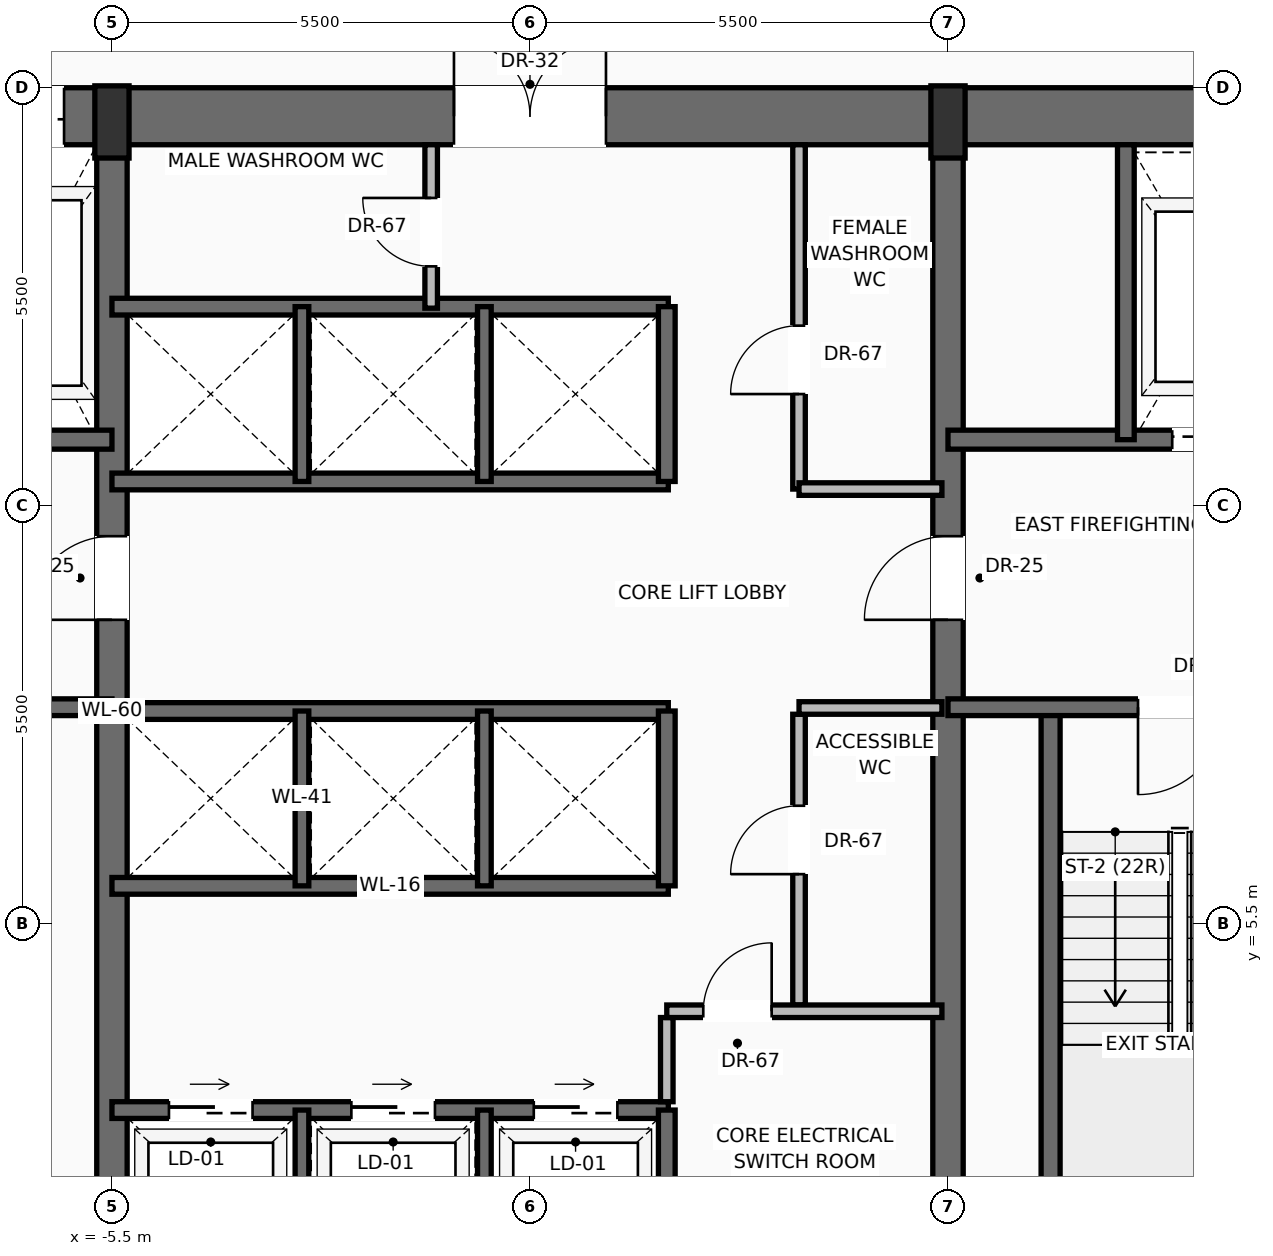
"""IFC4 building model, lengths in metres.
Left out: names, types, materials, properties, quantities, classifications, styles, units other than length and angle.
Written with IfcOpenShell. Run it as: python <this file> out.ifc"""

import sys

from ifc_helpers import new_model, si_unit, direction, frame, frame_2d, origin, origin_2d, place, context, subcontext, project, spatial, rectangle, extrude, source, transform, mapped, element, fill, save


model = new_model("IFC4")
c1 = context("Model", 3, precision=1e-05, world=origin(), true_north=direction((0.0, 1.0)))
c2 = subcontext(c1, "Body", "Model", "MODEL_VIEW")
j1 = project(units=[si_unit("LENGTHUNIT", "METRE"), si_unit("PLANEANGLEUNIT", "RADIAN")], contexts=[c1])
p1 = place(None, origin())
s1 = spatial("IfcSite", under=j1, at=p1, CompositionType="ELEMENT")
p2 = place(p1, origin())
s2 = spatial("IfcBuilding", under=s1, at=p2, CompositionType="ELEMENT")
p3 = place(p2, frame((0.0, 0.0, 109.9)))
s3 = spatial("IfcBuildingStorey", under=s2, at=p3, CompositionType="ELEMENT", Elevation=109.9)
p4 = place(p3, frame((-10.9, 16.125, 0.0), z_axis=(0.0, 0.0, 1.0), x_axis=(1.0, 0.0, 0.0)))
e1 = element("IfcWall", 1, at=p4, inside=s3, PredefinedType="SHEAR", context=c2, shape_type="SweptSolid", body=[
    extrude(rectangle(XDim=21.8, YDim=0.75, at=frame_2d((10.9, 0.0))), origin(), (0.0, 0.0, 1.0), 3.45),
])
p5 = place(p4, frame((3.47, 0.0, 0.0)))
e2 = element("IfcOpeningElement", 2, at=p5, cuts=e1, PredefinedType="OPENING", context=c2, shape_type="SweptSolid", body=[
    extrude(rectangle(XDim=1.3, YDim=2.3, at=frame_2d((0.65, 1.15))), frame((0.0, 0.385, 0.0), z_axis=(0.0, -1.0, 0.0), x_axis=(1.0, 0.0, 0.0)), (0.0, 0.0, 1.0), 0.77),
])
p6 = place(p4, frame((9.9, 0.0, 0.0)))
e3 = element("IfcOpeningElement", 3, at=p6, cuts=e1, PredefinedType="OPENING", context=c2, shape_type="SweptSolid", body=[
    extrude(rectangle(XDim=2.0, YDim=2.4, at=frame_2d((1.0, 1.2))), frame((0.0, 0.385, 0.0), z_axis=(0.0, -1.0, 0.0), x_axis=(1.0, 0.0, 0.0)), (0.0, 0.0, 1.0), 0.77),
])
p7 = place(p3, frame((-5.5, 0.475, 0.0), z_axis=(0.0, 0.0, 1.0), x_axis=(0.0, 1.0, 0.0)))
e4 = element("IfcWall", 4, at=p7, inside=s3, PredefinedType="SHEAR", context=c2, shape_type="SweptSolid", body=[
    extrude(rectangle(XDim=15.65, YDim=0.4, at=frame_2d((7.825, 0.0))), origin(), (0.0, 0.0, 1.0), 3.45),
])
p8 = place(p7, frame((9.025, 0.0, 0.0)))
e5 = element("IfcOpeningElement", 5, at=p8, cuts=e4, PredefinedType="OPENING", context=c2, shape_type="SweptSolid", body=[
    extrude(rectangle(XDim=1.1, YDim=2.2, at=frame_2d((0.55, 1.1))), frame((0.0, 0.21, 0.0), z_axis=(0.0, -1.0, 0.0), x_axis=(1.0, 0.0, 0.0)), (0.0, 0.0, 1.0), 0.42),
])
p9 = place(p3, frame((5.5, 0.475, 0.0), z_axis=(0.0, 0.0, 1.0), x_axis=(0.0, 1.0, 0.0)))
e6 = element("IfcWall", 6, at=p9, inside=s3, PredefinedType="SHEAR", context=c2, shape_type="SweptSolid", body=[
    extrude(rectangle(XDim=15.65, YDim=0.4, at=frame_2d((7.825, 0.0))), origin(), (0.0, 0.0, 1.0), 3.45),
])
p10 = place(p9, frame((9.025, 0.0, 0.0)))
e7 = element("IfcOpeningElement", 7, at=p10, cuts=e6, PredefinedType="OPENING", context=c2, shape_type="SweptSolid", body=[
    extrude(rectangle(XDim=1.1, YDim=2.2, at=frame_2d((0.55, 1.1))), frame((0.0, 0.21, 0.0), z_axis=(0.0, -1.0, 0.0), x_axis=(1.0, 0.0, 0.0)), (0.0, 0.0, 1.0), 0.42),
])
m1 = source(origin(), c2, "Body", "SweptSolid", [
    extrude(rectangle(XDim=0.45, YDim=0.95, at=origin_2d()), origin(), (0.0, 0.0, 1.0), 3.7),
])
for number, where, z_axis, x_axis in (
    (8, (-5.5, 16.05, 0.0), (0.0, 0.0, 1.0), (1.0, 0.0, 0.0)),
    (9, (5.5, 16.05, 0.0), (0.0, 0.0, 1.0), (1.0, 0.0, 0.0)),
):
    element("IfcColumn", number, at=place(p3, frame(where, z_axis=z_axis, x_axis=x_axis)), inside=s3, PredefinedType="PILASTER", context=c2, shape_type="MappedRepresentation", body=[
        mapped(m1, transform((0.0, 0.0, 0.0), scale=1.0)),
    ])
p11 = place(p3, frame((-5.5, 8.35, 0.0), z_axis=(0.0, 0.0, 1.0), x_axis=(-1.0, 0.0, 0.0)))
e10 = element("IfcWall", 10, at=p11, inside=s3, PredefinedType="SOLIDWALL", context=c2, shape_type="SweptSolid", body=[
    extrude(rectangle(XDim=4.65, YDim=0.22, at=frame_2d((2.325, 0.0))), origin(), (0.0, 0.0, 1.0), 3.45),
])
p12 = place(p11, frame((2.5, 0.0, 0.0)))
e11 = element("IfcOpeningElement", 11, at=p12, cuts=e10, PredefinedType="OPENING", context=c2, shape_type="SweptSolid", body=[
    extrude(rectangle(XDim=1.15, YDim=2.2, at=frame_2d((0.575, 1.1))), frame((0.0, 0.12, 0.0), z_axis=(0.0, -1.0, 0.0), x_axis=(1.0, 0.0, 0.0)), (0.0, 0.0, 1.0), 0.24),
])
p13 = place(p3, frame((-5.5, 11.87, 0.0), z_axis=(0.0, 0.0, 1.0), x_axis=(-1.0, 0.0, 0.0)))
e12 = element("IfcWall", 12, at=p13, inside=s3, PredefinedType="SOLIDWALL", context=c2, shape_type="SweptSolid", body=[
    extrude(rectangle(XDim=4.65, YDim=0.25, at=frame_2d((2.325, 0.0))), origin(), (0.0, 0.0, 1.0), 3.45),
])
p14 = place(p13, frame((2.95, 0.0, 0.0)))
e13 = element("IfcOpeningElement", 13, at=p14, cuts=e12, PredefinedType="OPENING", context=c2, shape_type="SweptSolid", body=[
    extrude(rectangle(XDim=1.2, YDim=2.25, at=frame_2d((0.6, 1.125))), frame((0.0, 0.135, 0.0), z_axis=(0.0, -1.0, 0.0), x_axis=(1.0, 0.0, 0.0)), (0.0, 0.0, 1.0), 0.27),
])
p15 = place(p3, frame((6.85, 0.85, 0.0), z_axis=(0.0, 0.0, 1.0), x_axis=(0.0, 1.0, 0.0)))
e14 = element("IfcWall", 14, at=p15, inside=s3, PredefinedType="SOLIDWALL", context=c2, shape_type="SweptSolid", body=[
    extrude(rectangle(XDim=7.5, YDim=0.25, at=frame_2d((3.75, 0.0))), origin(), (0.0, 0.0, 1.0), 3.45),
])
p16 = place(p3, frame((10.15, 8.35, 0.0), z_axis=(0.0, 0.0, 1.0), x_axis=(-1.0, 0.0, 0.0)))
e15 = element("IfcWall", 15, at=p16, inside=s3, PredefinedType="SOLIDWALL", context=c2, shape_type="SweptSolid", body=[
    extrude(rectangle(XDim=4.65, YDim=0.22, at=frame_2d((2.325, 0.0))), origin(), (0.0, 0.0, 1.0), 3.45),
])
p17 = place(p16, frame((1.0, 0.0, 0.0)))
e16 = element("IfcOpeningElement", 16, at=p17, cuts=e15, PredefinedType="OPENING", context=c2, shape_type="SweptSolid", body=[
    extrude(rectangle(XDim=1.15, YDim=2.2, at=frame_2d((0.575, 1.1))), frame((0.0, 0.12, 0.0), z_axis=(0.0, -1.0, 0.0), x_axis=(1.0, 0.0, 0.0)), (0.0, 0.0, 1.0), 0.24),
])
p18 = place(p3, frame((10.15, 11.87, 0.0), z_axis=(0.0, 0.0, 1.0), x_axis=(-1.0, 0.0, 0.0)))
e17 = element("IfcWall", 17, at=p18, inside=s3, PredefinedType="SOLIDWALL", context=c2, shape_type="SweptSolid", body=[
    extrude(rectangle(XDim=4.65, YDim=0.25, at=frame_2d((2.325, 0.0))), origin(), (0.0, 0.0, 1.0), 3.45),
])
p19 = place(p18, frame((0.5, 0.0, 0.0)))
e18 = element("IfcOpeningElement", 18, at=p19, cuts=e17, PredefinedType="OPENING", context=c2, shape_type="SweptSolid", body=[
    extrude(rectangle(XDim=1.2, YDim=2.25, at=frame_2d((0.6, 1.125))), frame((0.0, 0.135, 0.0), z_axis=(0.0, -1.0, 0.0), x_axis=(1.0, 0.0, 0.0)), (0.0, 0.0, 1.0), 0.27),
])
p20 = place(p3, frame((7.84, 11.87, 0.0), z_axis=(0.0, 0.0, 1.0), x_axis=(0.0, 1.0, 0.0)))
e19 = element("IfcWall", 19, at=p20, inside=s3, PredefinedType="SOLIDWALL", context=c2, shape_type="SweptSolid", body=[
    extrude(rectangle(XDim=3.88, YDim=0.22, at=frame_2d((1.94, 0.0))), origin(), (0.0, 0.0, 1.0), 3.45),
])
p21 = place(p3, frame((-5.5, 3.05, 0.0), z_axis=(0.0, 0.0, 1.0), x_axis=(1.0, 0.0, 0.0)))
e20 = element("IfcWall", 20, at=p21, inside=s3, PredefinedType="SOLIDWALL", context=c2, shape_type="SweptSolid", body=[
    extrude(rectangle(XDim=7.32, YDim=0.22, at=frame_2d((3.66, 0.0))), origin(), (0.0, 0.0, 1.0), 3.45),
])
p22 = place(p21, frame((0.75, 0.0, 0.0)))
e21 = element("IfcOpeningElement", 21, at=p22, cuts=e20, PredefinedType="OPENING", context=c2, shape_type="SweptSolid", body=[
    extrude(rectangle(XDim=1.1, YDim=2.2, at=frame_2d((0.55, 1.1))), frame((0.0, 0.12, 0.0), z_axis=(0.0, -1.0, 0.0), x_axis=(1.0, 0.0, 0.0)), (0.0, 0.0, 1.0), 0.24),
])
p23 = place(p21, frame((3.15, 0.0, 0.0)))
e22 = element("IfcOpeningElement", 22, at=p23, cuts=e20, PredefinedType="OPENING", context=c2, shape_type="SweptSolid", body=[
    extrude(rectangle(XDim=1.1, YDim=2.2, at=frame_2d((0.55, 1.1))), frame((0.0, 0.12, 0.0), z_axis=(0.0, -1.0, 0.0), x_axis=(1.0, 0.0, 0.0)), (0.0, 0.0, 1.0), 0.24),
])
p24 = place(p21, frame((5.55, 0.0, 0.0)))
e23 = element("IfcOpeningElement", 23, at=p24, cuts=e20, PredefinedType="OPENING", context=c2, shape_type="SweptSolid", body=[
    extrude(rectangle(XDim=1.1, YDim=2.2, at=frame_2d((0.55, 1.1))), frame((0.0, 0.12, 0.0), z_axis=(0.0, -1.0, 0.0), x_axis=(1.0, 0.0, 0.0)), (0.0, 0.0, 1.0), 0.24),
])
p25 = place(p3, frame((1.8, 0.85, 0.0), z_axis=(0.0, 0.0, 1.0), x_axis=(0.0, 1.0, 0.0)))
e24 = element("IfcWall", 24, at=p25, inside=s3, PredefinedType="SOLIDWALL", context=c2, shape_type="SweptSolid", body=[
    extrude(rectangle(XDim=2.2, YDim=0.22, at=frame_2d((1.1, 0.0))), origin(), (0.0, 0.0, 1.0), 3.45),
])
for number, where, z_axis, x_axis in (
    (25, (-3.0, 0.85, 0.0), (0.0, 0.0, 1.0), (0.0, 1.0, 0.0)),
    (26, (-0.6, 0.85, 0.0), (0.0, 0.0, 1.0), (0.0, 1.0, 0.0)),
):
    element("IfcWall", number, at=place(p3, frame(where, z_axis=z_axis, x_axis=x_axis)), inside=s3, PredefinedType="SOLIDWALL", context=c2, shape_type="SweptSolid", body=[
        extrude(rectangle(XDim=2.2, YDim=0.18, at=frame_2d((1.1, 0.0))), origin(), (0.0, 0.0, 1.0), 3.45),
    ])
p26 = place(p3, frame((1.8, 3.16, 0.0), z_axis=(0.0, 0.0, 1.0), x_axis=(0.0, 1.0, 0.0)))
e27 = element("IfcWall", 27, at=p26, inside=s3, PredefinedType="PARTITIONING", context=c2, shape_type="SweptSolid", body=[
    extrude(rectangle(XDim=1.108, YDim=0.165, at=frame_2d((0.554, 0.0))), origin(), (0.0, 0.0, 1.0), 3.442),
])
p27 = place(p3, frame((3.54, 4.433, 0.0), z_axis=(0.0, 0.0, 1.0), x_axis=(0.0, 1.0, 0.0)))
e28 = element("IfcWall", 28, at=p27, inside=s3, PredefinedType="PARTITIONING", context=c2, shape_type="SweptSolid", body=[
    extrude(rectangle(XDim=3.825, YDim=0.165, at=frame_2d((1.913, 0.0))), origin(), (0.0, 0.0, 1.0), 3.442),
])
p28 = place(p27, frame((1.721, 0.0, 0.0)))
e29 = element("IfcOpeningElement", 29, at=p28, cuts=e28, PredefinedType="OPENING", context=c2, shape_type="SweptSolid", body=[
    extrude(rectangle(XDim=0.9, YDim=2.1, at=frame_2d((0.45, 1.05))), frame((0.0, 0.093, 0.0), z_axis=(0.0, -1.0, 0.0), x_axis=(1.0, 0.0, 0.0)), (0.0, 0.0, 1.0), 0.185),
])
p29 = place(p3, frame((3.54, 8.34, 0.0), z_axis=(0.0, 0.0, 1.0), x_axis=(1.0, 0.0, 0.0)))
e30 = element("IfcWall", 30, at=p29, inside=s3, PredefinedType="PARTITIONING", context=c2, shape_type="SweptSolid", body=[
    extrude(rectangle(XDim=1.88, YDim=0.165, at=frame_2d((0.94, 0.0))), origin(), (0.0, 0.0, 1.0), 3.442),
])
p30 = place(p3, frame((1.8, 4.35, 0.0), z_axis=(0.0, 0.0, 1.0), x_axis=(1.0, 0.0, 0.0)))
e31 = element("IfcWall", 31, at=p30, inside=s3, PredefinedType="PARTITIONING", context=c2, shape_type="SweptSolid", body=[
    extrude(rectangle(XDim=3.62, YDim=0.165, at=frame_2d((1.81, 0.0))), origin(), (0.0, 0.0, 1.0), 3.442),
])
p31 = place(p30, frame((0.48, 0.0, 0.0)))
e32 = element("IfcOpeningElement", 32, at=p31, cuts=e31, PredefinedType="OPENING", context=c2, shape_type="SweptSolid", body=[
    extrude(rectangle(XDim=0.9, YDim=2.1, at=frame_2d((0.45, 1.05))), frame((0.0, 0.093, 0.0), z_axis=(0.0, -1.0, 0.0), x_axis=(1.0, 0.0, 0.0)), (0.0, 0.0, 1.0), 0.185),
])
for number, where, z_axis, x_axis in (
    (33, (-5.5, 6.0, 0.0), (0.0, 0.0, 1.0), (1.0, 0.0, 0.0)),
    (34, (-5.5, 8.3, 0.0), (0.0, 0.0, 1.0), (1.0, 0.0, 0.0)),
):
    element("IfcWall", number, at=place(p3, frame(where, z_axis=z_axis, x_axis=x_axis)), inside=s3, PredefinedType="SOLIDWALL", context=c2, shape_type="SweptSolid", body=[
        extrude(rectangle(XDim=7.32, YDim=0.22, at=frame_2d((3.66, 0.0))), origin(), (0.0, 0.0, 1.0), 3.45),
    ])
p32 = place(p3, frame((1.8, 6.0, 0.0), z_axis=(0.0, 0.0, 1.0), x_axis=(0.0, 1.0, 0.0)))
e35 = element("IfcWall", 35, at=p32, inside=s3, PredefinedType="SOLIDWALL", context=c2, shape_type="SweptSolid", body=[
    extrude(rectangle(XDim=2.3, YDim=0.22, at=frame_2d((1.15, 0.0))), origin(), (0.0, 0.0, 1.0), 3.45),
])
for number, where, z_axis, x_axis in (
    (36, (-3.0, 6.0, 0.0), (0.0, 0.0, 1.0), (0.0, 1.0, 0.0)),
    (37, (-0.6, 6.0, 0.0), (0.0, 0.0, 1.0), (0.0, 1.0, 0.0)),
):
    element("IfcWall", number, at=place(p3, frame(where, z_axis=z_axis, x_axis=x_axis)), inside=s3, PredefinedType="SOLIDWALL", context=c2, shape_type="SweptSolid", body=[
        extrude(rectangle(XDim=2.3, YDim=0.18, at=frame_2d((1.15, 0.0))), origin(), (0.0, 0.0, 1.0), 3.45),
    ])
for number, where, z_axis, x_axis in (
    (38, (-5.5, 11.32, 0.0), (0.0, 0.0, 1.0), (1.0, 0.0, 0.0)),
    (39, (-5.5, 13.62, 0.0), (0.0, 0.0, 1.0), (1.0, 0.0, 0.0)),
):
    element("IfcWall", number, at=place(p3, frame(where, z_axis=z_axis, x_axis=x_axis)), inside=s3, PredefinedType="SOLIDWALL", context=c2, shape_type="SweptSolid", body=[
        extrude(rectangle(XDim=7.32, YDim=0.22, at=frame_2d((3.66, 0.0))), origin(), (0.0, 0.0, 1.0), 3.45),
    ])
p33 = place(p3, frame((1.8, 11.32, 0.0), z_axis=(0.0, 0.0, 1.0), x_axis=(0.0, 1.0, 0.0)))
e40 = element("IfcWall", 40, at=p33, inside=s3, PredefinedType="SOLIDWALL", context=c2, shape_type="SweptSolid", body=[
    extrude(rectangle(XDim=2.3, YDim=0.22, at=frame_2d((1.15, 0.0))), origin(), (0.0, 0.0, 1.0), 3.45),
])
for number, where, z_axis, x_axis in (
    (41, (-3.0, 11.32, 0.0), (0.0, 0.0, 1.0), (0.0, 1.0, 0.0)),
    (42, (-0.6, 11.32, 0.0), (0.0, 0.0, 1.0), (0.0, 1.0, 0.0)),
):
    element("IfcWall", number, at=place(p3, frame(where, z_axis=z_axis, x_axis=x_axis)), inside=s3, PredefinedType="SOLIDWALL", context=c2, shape_type="SweptSolid", body=[
        extrude(rectangle(XDim=2.3, YDim=0.18, at=frame_2d((1.15, 0.0))), origin(), (0.0, 0.0, 1.0), 3.45),
    ])
p34 = place(p3, frame((-1.3, 13.6, 0.0), z_axis=(0.0, 0.0, 1.0), x_axis=(0.0, 1.0, 0.0)))
e43 = element("IfcWall", 43, at=p34, inside=s3, PredefinedType="PARTITIONING", context=c2, shape_type="SweptSolid", body=[
    extrude(rectangle(XDim=2.15, YDim=0.165, at=frame_2d((1.075, 0.0))), origin(), (0.0, 0.0, 1.0), 3.442),
])
p35 = place(p34, frame((0.55, 0.0, 0.0)))
e44 = element("IfcOpeningElement", 44, at=p35, cuts=e43, PredefinedType="OPENING", context=c2, shape_type="SweptSolid", body=[
    extrude(rectangle(XDim=0.9, YDim=2.1, at=frame_2d((0.45, 1.05))), frame((0.0, 0.093, 0.0), z_axis=(0.0, -1.0, 0.0), x_axis=(1.0, 0.0, 0.0)), (0.0, 0.0, 1.0), 0.185),
])
p36 = place(p3, frame((3.54, 11.22, 0.0), z_axis=(0.0, 0.0, 1.0), x_axis=(0.0, 1.0, 0.0)))
e45 = element("IfcWall", 45, at=p36, inside=s3, PredefinedType="PARTITIONING", context=c2, shape_type="SweptSolid", body=[
    extrude(rectangle(XDim=4.53, YDim=0.165, at=frame_2d((2.265, 0.0))), origin(), (0.0, 0.0, 1.0), 3.442),
])
p37 = place(p36, frame((1.25, 0.0, 0.0)))
e46 = element("IfcOpeningElement", 46, at=p37, cuts=e45, PredefinedType="OPENING", context=c2, shape_type="SweptSolid", body=[
    extrude(rectangle(XDim=0.9, YDim=2.1, at=frame_2d((0.45, 1.05))), frame((0.0, 0.093, 0.0), z_axis=(0.0, -1.0, 0.0), x_axis=(1.0, 0.0, 0.0)), (0.0, 0.0, 1.0), 0.185),
])
p38 = place(p3, frame((3.54, 11.22, 0.0), z_axis=(0.0, 0.0, 1.0), x_axis=(1.0, 0.0, 0.0)))
e47 = element("IfcWall", 47, at=p38, inside=s3, PredefinedType="PARTITIONING", context=c2, shape_type="SweptSolid", body=[
    extrude(rectangle(XDim=1.88, YDim=0.165, at=frame_2d((0.94, 0.0))), origin(), (0.0, 0.0, 1.0), 3.442),
])
m2 = source(origin(), c2, "Body", "SweptSolid", [
    extrude(rectangle(XDim=1.1, YDim=2.2, at=frame_2d((0.55, 1.1))), frame((0.0, 0.025, 0.0), z_axis=(0.0, -1.0, 0.0), x_axis=(1.0, 0.0, 0.0)), (0.0, 0.0, 1.0), 0.05),
])
p39 = place(p8, origin())
e48 = element("IfcDoor", 48, at=p39, inside=s3, OperationType="SINGLE_SWING_LEFT", PredefinedType="DOOR", context=c2, shape_type="MappedRepresentation", body=[
    mapped(m2, transform((0.0, 0.0, 0.0), scale=1.0)),
])
fill(e5, e48)
m3 = source(origin(), c2, "Body", "SweptSolid", [
    extrude(rectangle(XDim=1.3, YDim=2.3, at=frame_2d((0.65, 1.15))), frame((0.0, 0.025, 0.0), z_axis=(0.0, -1.0, 0.0), x_axis=(1.0, 0.0, 0.0)), (0.0, 0.0, 1.0), 0.05),
])
p40 = place(p5, origin())
e49 = element("IfcDoor", 49, at=p40, inside=s3, OperationType="SLIDING_TO_RIGHT", PredefinedType="DOOR", context=c2, shape_type="MappedRepresentation", body=[
    mapped(m3, transform((0.0, 0.0, 0.0), scale=1.0)),
])
fill(e2, e49)
m4 = source(origin(), c2, "Body", "SweptSolid", [
    extrude(rectangle(XDim=1.15, YDim=2.2, at=frame_2d((0.575, 1.1))), frame((0.0, 0.025, 0.0), z_axis=(0.0, -1.0, 0.0), x_axis=(1.0, 0.0, 0.0)), (0.0, 0.0, 1.0), 0.05),
])
p41 = place(p17, origin())
e50 = element("IfcDoor", 50, at=p41, inside=s3, OperationType="SINGLE_SWING_RIGHT", PredefinedType="DOOR", context=c2, shape_type="MappedRepresentation", body=[
    mapped(m4, transform((0.0, 0.0, 0.0), scale=1.0)),
])
fill(e16, e50)
p42 = place(p10, origin())
e51 = element("IfcDoor", 51, at=p42, inside=s3, OperationType="SINGLE_SWING_LEFT", PredefinedType="DOOR", context=c2, shape_type="MappedRepresentation", body=[
    mapped(m2, transform((0.0, 0.0, 0.0), scale=1.0)),
])
fill(e7, e51)
m5 = source(origin(), c2, "Body", "SweptSolid", [
    extrude(rectangle(XDim=1.2, YDim=2.25, at=frame_2d((0.6, 1.125))), frame((0.0, 0.025, 0.0), z_axis=(0.0, -1.0, 0.0), x_axis=(1.0, 0.0, 0.0)), (0.0, 0.0, 1.0), 0.05),
])
p43 = place(p19, origin())
e52 = element("IfcDoor", 52, at=p43, inside=s3, OperationType="SLIDING_TO_RIGHT", PredefinedType="DOOR", context=c2, shape_type="MappedRepresentation", body=[
    mapped(m5, transform((0.0, 0.0, 0.0), scale=1.0)),
])
fill(e18, e52)
m6 = source(origin(), c2, "Body", "SweptSolid", [
    extrude(rectangle(XDim=2.0, YDim=2.4, at=frame_2d((1.0, 1.2))), frame((0.0, 0.025, 0.0), z_axis=(0.0, -1.0, 0.0), x_axis=(1.0, 0.0, 0.0)), (0.0, 0.0, 1.0), 0.05),
])
p44 = place(p6, origin())
e53 = element("IfcDoor", 53, at=p44, inside=s3, OperationType="DOUBLE_DOOR_SINGLE_SWING", PredefinedType="DOOR", context=c2, shape_type="MappedRepresentation", body=[
    mapped(m6, transform((0.0, 0.0, 0.0), scale=1.0)),
])
fill(e3, e53)
m7 = source(origin(), c2, "Body", "SweptSolid", [
    extrude(rectangle(XDim=1.1, YDim=2.2, at=frame_2d((0.55, 1.1))), frame((0.0, 0.025, 0.0), z_axis=(0.0, -1.0, 0.0), x_axis=(1.0, 0.0, 0.0)), (0.0, 0.0, 1.0), 0.05),
])
p45 = place(p22, origin())
e54 = element("IfcDoor", 54, at=p45, inside=s3, OperationType="SLIDING_TO_RIGHT", PredefinedType="DOOR", context=c2, shape_type="MappedRepresentation", body=[
    mapped(m7, transform((0.0, 0.0, 0.0), scale=1.0)),
])
fill(e21, e54)
p46 = place(p23, origin())
e55 = element("IfcDoor", 55, at=p46, inside=s3, OperationType="SLIDING_TO_RIGHT", PredefinedType="DOOR", context=c2, shape_type="MappedRepresentation", body=[
    mapped(m7, transform((0.0, 0.0, 0.0), scale=1.0)),
])
fill(e22, e55)
p47 = place(p24, origin())
e56 = element("IfcDoor", 56, at=p47, inside=s3, OperationType="SLIDING_TO_RIGHT", PredefinedType="DOOR", context=c2, shape_type="MappedRepresentation", body=[
    mapped(m7, transform((0.0, 0.0, 0.0), scale=1.0)),
])
fill(e23, e56)
m8 = source(origin(), c2, "Body", "SweptSolid", [
    extrude(rectangle(XDim=0.9, YDim=2.1, at=frame_2d((0.45, 1.05))), frame((0.0, 0.025, 0.0), z_axis=(0.0, -1.0, 0.0), x_axis=(1.0, 0.0, 0.0)), (0.0, 0.0, 1.0), 0.05),
])
p48 = place(p31, origin())
e57 = element("IfcDoor", 57, at=p48, inside=s3, OperationType="SINGLE_SWING_RIGHT", PredefinedType="DOOR", context=c2, shape_type="MappedRepresentation", body=[
    mapped(m8, transform((0.0, 0.0, 0.0), scale=1.0)),
])
fill(e32, e57)
p49 = place(p28, origin())
e58 = element("IfcDoor", 58, at=p49, inside=s3, OperationType="SINGLE_SWING_LEFT", PredefinedType="DOOR", context=c2, shape_type="MappedRepresentation", body=[
    mapped(m8, transform((0.0, 0.0, 0.0), scale=1.0)),
])
fill(e29, e58)
p50 = place(p35, origin())
e59 = element("IfcDoor", 59, at=p50, inside=s3, OperationType="SINGLE_SWING_RIGHT", PredefinedType="DOOR", context=c2, shape_type="MappedRepresentation", body=[
    mapped(m8, transform((0.0, 0.0, 0.0), scale=1.0)),
])
fill(e44, e59)
p51 = place(p37, origin())
e60 = element("IfcDoor", 60, at=p51, inside=s3, OperationType="SINGLE_SWING_LEFT", PredefinedType="DOOR", context=c2, shape_type="MappedRepresentation", body=[
    mapped(m8, transform((0.0, 0.0, 0.0), scale=1.0)),
])
fill(e46, e60)
save(model, sys.argv[1])
